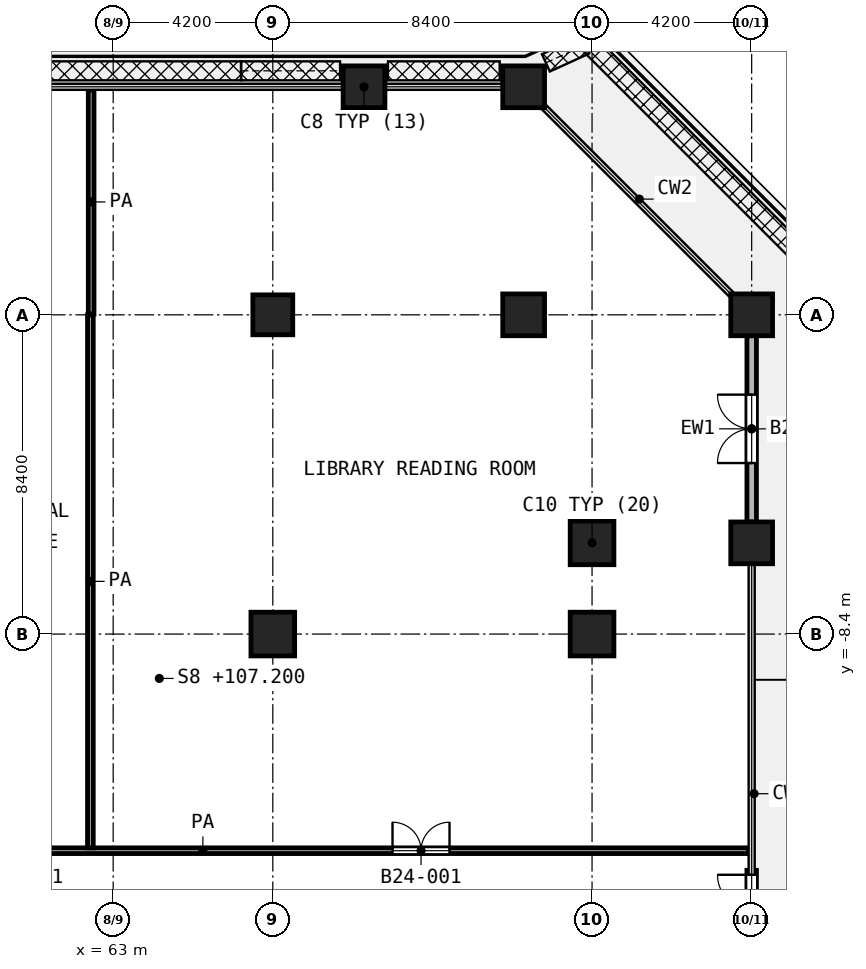
"""IFC4 building model, lengths in metres.
Left out: names, types, materials, properties, quantities, classifications, styles, units other than length and angle.
Written with IfcOpenShell. Run it as: python <this file> out.ifc"""

import sys

from ifc_helpers import new_model, si_unit, direction, frame, frame_2d, origin, origin_2d, place, context, subcontext, project, spatial, rectangle, extrude, element, fill, save


model = new_model("IFC4")
c1 = context("Model", 3, precision=1e-05, world=origin(), true_north=direction((0.0, 1.0)))
c2 = subcontext(c1, "Body", "Model", "MODEL_VIEW")
j1 = project(units=[si_unit("LENGTHUNIT", "METRE"), si_unit("PLANEANGLEUNIT", "RADIAN")], contexts=[c1])
p1 = place(None, origin())
s1 = spatial("IfcSite", under=j1, at=p1, CompositionType="ELEMENT")
p2 = place(p1, origin())
s2 = spatial("IfcBuilding", under=s1, at=p2, CompositionType="ELEMENT")
p3 = place(p2, frame((0.0, 0.0, 107.2)))
s3 = spatial("IfcBuildingStorey", under=s2, at=p3, CompositionType="ELEMENT", Elevation=107.2)
p4 = place(p3, frame((67.2, 0.0, 0.0), z_axis=(0.0, 0.0, 1.0), x_axis=(1.0, 0.0, 0.0)))
e1 = element("IfcColumn", 1, at=p4, inside=s3, PredefinedType="COLUMN", context=c2, shape_type="SweptSolid", body=[
    extrude(rectangle(XDim=1.05, YDim=1.05, at=origin_2d()), origin(), (0.0, 0.0, 1.0), 4.2),
])
p5 = place(p3, frame((73.8, 0.0, 0.0), z_axis=(0.0, 0.0, 1.0), x_axis=(1.0, 0.0, 0.0)))
e2 = element("IfcColumn", 2, at=p5, inside=s3, PredefinedType="COLUMN", context=c2, shape_type="SweptSolid", body=[
    extrude(rectangle(XDim=1.1, YDim=1.1, at=origin_2d()), origin(), (0.0, 0.0, 1.0), 4.2),
])
p6 = place(p3, frame((75.6, -6.0, 0.0), z_axis=(0.0, 0.0, 1.0), x_axis=(1.0, 0.0, 0.0)))
e3 = element("IfcColumn", 3, at=p6, inside=s3, PredefinedType="COLUMN", context=c2, shape_type="SweptSolid", body=[
    extrude(rectangle(XDim=1.15, YDim=1.15, at=origin_2d()), origin(), (0.0, 0.0, 1.0), 4.2),
])
p7 = place(p3, frame((79.8, -6.0, 0.0), z_axis=(0.0, 0.0, 1.0), x_axis=(1.0, 0.0, 0.0)))
e4 = element("IfcColumn", 4, at=p7, inside=s3, PredefinedType="COLUMN", context=c2, shape_type="SweptSolid", body=[
    extrude(rectangle(XDim=1.1, YDim=1.1, at=origin_2d()), origin(), (0.0, 0.0, 1.0), 4.2),
])
for number, where, z_axis, x_axis in (
    (5, (67.2, -8.4, 0.0), (0.0, 0.0, 1.0), (1.0, 0.0, 0.0)),
    (6, (75.6, -8.4, 0.0), (0.0, 0.0, 1.0), (1.0, 0.0, 0.0)),
):
    element("IfcColumn", number, at=place(p3, frame(where, z_axis=z_axis, x_axis=x_axis)), inside=s3, PredefinedType="COLUMN", context=c2, shape_type="SweptSolid", body=[
        extrude(rectangle(XDim=1.15, YDim=1.15, at=origin_2d()), origin(), (0.0, 0.0, 1.0), 4.2),
    ])
for number, where, z_axis, x_axis in (
    (7, (69.6, 6.0, 0.0), (0.0, 0.0, 1.0), (1.0, 0.0, 0.0)),
    (8, (73.8, 6.0, 0.0), (0.0, 0.0, 1.0), (1.0, 0.0, 0.0)),
    (9, (79.8, 0.0, 0.0), (0.0, 0.0, 1.0), (1.0, 0.0, 0.0)),
):
    element("IfcColumn", number, at=place(p3, frame(where, z_axis=z_axis, x_axis=x_axis)), inside=s3, PredefinedType="COLUMN", context=c2, shape_type="SweptSolid", body=[
        extrude(rectangle(XDim=1.1, YDim=1.1, at=origin_2d()), origin(), (0.0, 0.0, 1.0), 4.2),
    ])
p8 = place(p3, frame((79.8, -18.65, 0.0), z_axis=(0.0, 0.0, 1.0), x_axis=(0.0, 1.0, 0.0)))
e10 = element("IfcWall", 10, at=p8, inside=s3, PredefinedType="SOLIDWALL", context=c2, shape_type="SweptSolid", body=[
    extrude(rectangle(XDim=4.033, YDim=0.25, at=frame_2d((2.017, 0.0))), origin(), (0.0, 0.0, 1.0), 3.48),
])
p9 = place(p8, frame((2.117, 0.0, 0.0)))
e11 = element("IfcOpeningElement", 11, at=p9, cuts=e10, PredefinedType="OPENING", context=c2, shape_type="SweptSolid", body=[
    extrude(rectangle(XDim=1.8, YDim=2.1, at=frame_2d((0.9, 1.05))), frame((0.0, 0.135, 0.0), z_axis=(0.0, -1.0, 0.0), x_axis=(1.0, 0.0, 0.0)), (0.0, 0.0, 1.0), 0.27),
])
p10 = place(p3, frame((79.8, -5.45, 0.0), z_axis=(0.0, 0.0, 1.0), x_axis=(0.0, 1.0, 0.0)))
e12 = element("IfcWall", 12, at=p10, inside=s3, PredefinedType="SOLIDWALL", context=c2, shape_type="SweptSolid", body=[
    extrude(rectangle(XDim=4.9, YDim=0.25, at=frame_2d((2.45, 0.0))), origin(), (0.0, 0.0, 1.0), 3.48),
])
p11 = place(p10, frame((1.55, 0.0, 0.0)))
e13 = element("IfcOpeningElement", 13, at=p11, cuts=e12, PredefinedType="OPENING", context=c2, shape_type="SweptSolid", body=[
    extrude(rectangle(XDim=1.8, YDim=2.1, at=frame_2d((0.9, 1.05))), frame((0.0, 0.135, 0.0), z_axis=(0.0, -1.0, 0.0), x_axis=(1.0, 0.0, 0.0)), (0.0, 0.0, 1.0), 0.27),
])
p12 = place(p3, frame((51.0, -14.1, 0.0), z_axis=(0.0, 0.0, 1.0), x_axis=(1.0, 0.0, 0.0)))
e14 = element("IfcWall", 14, at=p12, inside=s3, PredefinedType="PARTITIONING", context=c2, shape_type="SweptSolid", body=[
    extrude(rectangle(XDim=28.72, YDim=0.15, at=frame_2d((14.36, 0.0))), origin(), (0.0, 0.0, 1.0), 3.6),
])
p13 = place(p12, frame((9.1, 0.0, 0.0)))
e15 = element("IfcOpeningElement", 15, at=p13, cuts=e14, PredefinedType="OPENING", context=c2, shape_type="SweptSolid", body=[
    extrude(rectangle(XDim=1.0, YDim=2.1, at=frame_2d((0.5, 1.05))), frame((0.0, 0.085, 0.0), z_axis=(0.0, -1.0, 0.0), x_axis=(1.0, 0.0, 0.0)), (0.0, 0.0, 1.0), 0.17),
])
p14 = place(p12, frame((19.35, 0.0, 0.0)))
e16 = element("IfcOpeningElement", 16, at=p14, cuts=e14, PredefinedType="OPENING", context=c2, shape_type="SweptSolid", body=[
    extrude(rectangle(XDim=1.5, YDim=2.1, at=frame_2d((0.75, 1.05))), frame((0.0, 0.085, 0.0), z_axis=(0.0, -1.0, 0.0), x_axis=(1.0, 0.0, 0.0)), (0.0, 0.0, 1.0), 0.17),
])
p15 = place(p3, frame((62.4, -14.025, 0.0), z_axis=(0.0, 0.0, 1.0), x_axis=(0.0, 1.0, 0.0)))
e17 = element("IfcWall", 17, at=p15, inside=s3, PredefinedType="PARTITIONING", context=c2, shape_type="SweptSolid", body=[
    extrude(rectangle(XDim=14.023, YDim=0.15, at=frame_2d((7.011, 0.0))), origin(), (0.0, 0.0, 1.0), 3.6),
])
p16 = place(p3, frame((62.42, 0.02, 0.0), z_axis=(0.0, 0.0, 1.0), x_axis=(0.0, 1.0, 0.0)))
e18 = element("IfcWall", 18, at=p16, inside=s3, PredefinedType="PARTITIONING", context=c2, shape_type="SweptSolid", body=[
    extrude(rectangle(XDim=5.9, YDim=0.15, at=frame_2d((2.95, 0.0))), origin(), (0.0, 0.0, 1.0), 3.6),
])
p17 = place(p9, origin())
e19 = element("IfcDoor", 19, at=p17, inside=s3, OperationType="DOUBLE_DOOR_SINGLE_SWING", PredefinedType="DOOR", context=c2, shape_type="SweptSolid", body=[
    extrude(rectangle(XDim=1.8, YDim=2.1, at=frame_2d((0.9, 1.05))), frame((0.0, 0.025, 0.0), z_axis=(0.0, -1.0, 0.0), x_axis=(1.0, 0.0, 0.0)), (0.0, 0.0, 1.0), 0.05),
])
fill(e11, e19)
p18 = place(p11, origin())
e20 = element("IfcDoor", 20, at=p18, inside=s3, OperationType="DOUBLE_DOOR_SINGLE_SWING", PredefinedType="DOOR", context=c2, shape_type="SweptSolid", body=[
    extrude(rectangle(XDim=1.8, YDim=2.1, at=frame_2d((0.9, 1.05))), frame((0.0, 0.025, 0.0), z_axis=(0.0, -1.0, 0.0), x_axis=(1.0, 0.0, 0.0)), (0.0, 0.0, 1.0), 0.05),
])
fill(e13, e20)
p19 = place(p14, origin())
e21 = element("IfcDoor", 21, at=p19, inside=s3, OperationType="DOUBLE_DOOR_SINGLE_SWING", PredefinedType="DOOR", context=c2, shape_type="SweptSolid", body=[
    extrude(rectangle(XDim=1.5, YDim=2.1, at=frame_2d((0.75, 1.05))), frame((0.0, 0.025, 0.0), z_axis=(0.0, -1.0, 0.0), x_axis=(1.0, 0.0, 0.0)), (0.0, 0.0, 1.0), 0.05),
])
fill(e16, e21)
save(model, sys.argv[1])
